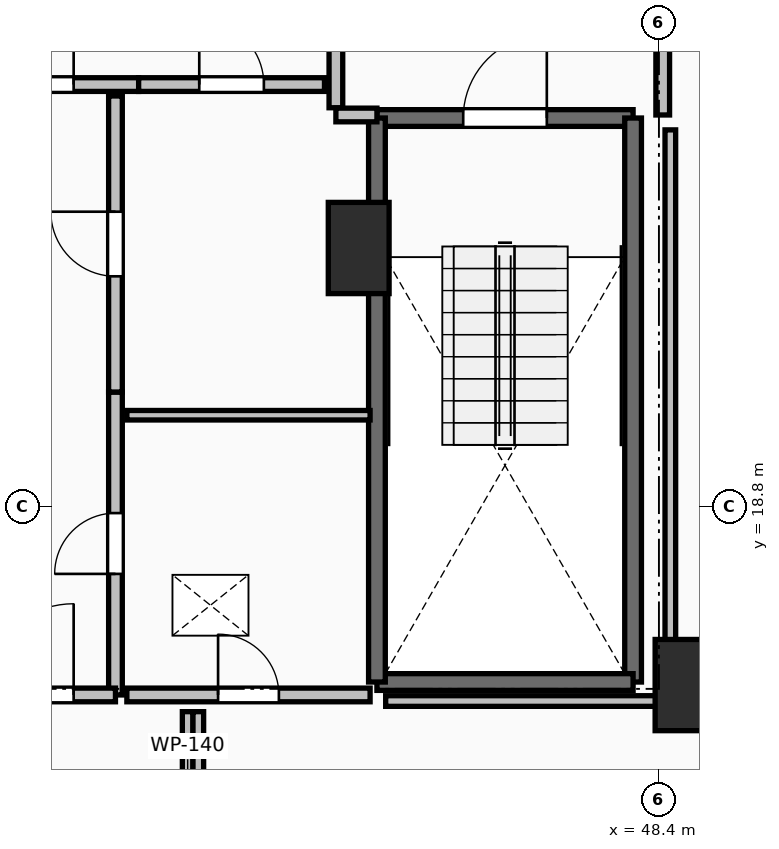
"""IFC4 building model, lengths in metres.
Left out: names, types, materials, properties, quantities, classifications, styles, units other than length and angle.
Written with IfcOpenShell. Run it as: python <this file> out.ifc"""

import sys

from ifc_helpers import new_model, si_unit, direction, frame, frame_2d, origin, origin_2d, place, context, subcontext, project, spatial, rectangle, extrude, element, fill, save


model = new_model("IFC4")
c1 = context("Model", 3, precision=1e-05, world=origin(), true_north=direction((0.0, 1.0)))
c2 = subcontext(c1, "Body", "Model", "MODEL_VIEW")
j1 = project(units=[si_unit("LENGTHUNIT", "METRE"), si_unit("PLANEANGLEUNIT", "RADIAN")], contexts=[c1])
p1 = place(None, origin())
s1 = spatial("IfcSite", under=j1, at=p1, CompositionType="ELEMENT")
p2 = place(p1, origin())
s2 = spatial("IfcBuilding", under=s1, at=p2, CompositionType="ELEMENT")
p3 = place(p2, frame((0.0, 0.0, 167.6)))
s3 = spatial("IfcBuildingStorey", under=s2, at=p3, CompositionType="ELEMENT", Elevation=167.6)
for number, where, z_axis, x_axis in (
    (1, (48.75, 16.45, 0.0), (0.0, 0.0, 1.0), (1.0, 0.0, 0.0)),
    (2, (44.45, 22.2, 0.0), (0.0, 0.0, 1.0), (1.0, 0.0, 0.0)),
):
    element("IfcColumn", number, at=place(p3, frame(where, z_axis=z_axis, x_axis=x_axis)), inside=s3, PredefinedType="PILASTER", context=c2, shape_type="SweptSolid", body=[
        extrude(rectangle(XDim=0.8, YDim=1.2, at=origin_2d()), origin(), (0.0, 0.0, 1.0), 3.5),
    ])
p4 = place(p3, frame((44.69, 23.91, 0.0), z_axis=(0.0, 0.0, 1.0), x_axis=(1.0, 0.0, 0.0)))
e3 = element("IfcWall", 3, at=p4, inside=s3, PredefinedType="SOLIDWALL", context=c2, shape_type="SweptSolid", body=[
    extrude(rectangle(XDim=3.37, YDim=0.22, at=frame_2d((1.685, 0.0))), origin(), (0.0, 0.0, 1.0), 3.24),
])
p5 = place(p4, frame((1.135, 0.0, 0.0)))
e4 = element("IfcOpeningElement", 4, at=p5, cuts=e3, PredefinedType="OPENING", context=c2, shape_type="SweptSolid", body=[
    extrude(rectangle(XDim=1.1, YDim=2.15, at=frame_2d((0.55, 1.075))), frame((0.0, 0.125, 0.0), z_axis=(0.0, -1.0, 0.0), x_axis=(1.0, 0.0, 0.0)), (0.0, 0.0, 1.0), 0.25),
])
p6 = place(p3, frame((48.06, 23.91, 0.0), z_axis=(0.0, 0.0, 1.0), x_axis=(0.0, -1.0, 0.0)))
e5 = element("IfcWall", 5, at=p6, inside=s3, PredefinedType="SOLIDWALL", context=c2, shape_type="SweptSolid", body=[
    extrude(rectangle(XDim=7.42, YDim=0.22, at=frame_2d((3.71, 0.0))), origin(), (0.0, 0.0, 1.0), 3.24),
])
p7 = place(p3, frame((48.06, 16.49, 0.0), z_axis=(0.0, 0.0, 1.0), x_axis=(-1.0, 0.0, 0.0)))
e6 = element("IfcWall", 6, at=p7, inside=s3, PredefinedType="SOLIDWALL", context=c2, shape_type="SweptSolid", body=[
    extrude(rectangle(XDim=3.37, YDim=0.22, at=frame_2d((1.685, 0.0))), origin(), (0.0, 0.0, 1.0), 3.24),
])
p8 = place(p3, frame((44.69, 16.49, 0.0), z_axis=(0.0, 0.0, 1.0), x_axis=(0.0, 1.0, 0.0)))
e7 = element("IfcWall", 7, at=p8, inside=s3, PredefinedType="SOLIDWALL", context=c2, shape_type="SweptSolid", body=[
    extrude(rectangle(XDim=7.42, YDim=0.22, at=frame_2d((3.71, 0.0))), origin(), (0.0, 0.0, 1.0), 3.24),
])
p9 = place(p3, frame((44.15, 27.955, 0.0), z_axis=(0.0, 0.0, 1.0), x_axis=(0.0, -1.0, 0.0)))
e8 = element("IfcWall", 8, at=p9, inside=s3, PredefinedType="PARTITIONING", context=c2, shape_type="SweptSolid", body=[
    extrude(rectangle(XDim=3.91, YDim=0.18, at=frame_2d((1.955, 0.0))), origin(), (0.0, 0.0, 1.0), 3.24),
])
p10 = place(p9, frame((1.355, 0.0, 0.0)))
e9 = element("IfcOpeningElement", 9, at=p10, cuts=e8, PredefinedType="OPENING", context=c2, shape_type="SweptSolid", body=[
    extrude(rectangle(XDim=1.2, YDim=2.15, at=frame_2d((0.6, 1.075))), frame((0.0, 0.105, 0.0), z_axis=(0.0, -1.0, 0.0), x_axis=(1.0, 0.0, 0.0)), (0.0, 0.0, 1.0), 0.21),
])
p11 = place(p3, frame((44.15, 23.95, 0.0), z_axis=(0.0, 0.0, 1.0), x_axis=(1.0, 0.0, 0.0)))
e10 = element("IfcWall", 10, at=p11, inside=s3, PredefinedType="PARTITIONING", context=c2, shape_type="SweptSolid", body=[
    extrude(rectangle(XDim=0.54, YDim=0.18, at=frame_2d((0.27, 0.0))), origin(), (0.0, 0.0, 1.0), 3.24),
])
p12 = place(p3, frame((48.45, 23.95, 0.0), z_axis=(0.0, 0.0, 1.0), x_axis=(0.0, 1.0, 0.0)))
e11 = element("IfcWall", 11, at=p12, inside=s3, PredefinedType="PARTITIONING", context=c2, shape_type="SweptSolid", body=[
    extrude(rectangle(XDim=4.05, YDim=0.18, at=frame_2d((2.025, 0.0))), origin(), (0.0, 0.0, 1.0), 3.24),
])
p13 = place(p12, frame((1.425, 0.0, 0.0)))
e12 = element("IfcOpeningElement", 12, at=p13, cuts=e11, PredefinedType="OPENING", context=c2, shape_type="SweptSolid", body=[
    extrude(rectangle(XDim=1.2, YDim=2.15, at=frame_2d((0.6, 1.075))), frame((0.0, 0.105, 0.0), z_axis=(0.0, -1.0, 0.0), x_axis=(1.0, 0.0, 0.0)), (0.0, 0.0, 1.0), 0.21),
])
p14 = place(p3, frame((38.645, 24.35, 0.0), z_axis=(0.0, 0.0, 1.0), x_axis=(1.0, 0.0, 0.0)))
e13 = element("IfcWall", 13, at=p14, inside=s3, PredefinedType="PARTITIONING", context=c2, shape_type="SweptSolid", body=[
    extrude(rectangle(XDim=2.91, YDim=0.18, at=frame_2d((1.455, 0.0))), origin(), (0.0, 0.0, 1.0), 3.24),
])
p15 = place(p14, frame((0.855, 0.0, 0.0)))
e14 = element("IfcOpeningElement", 14, at=p15, cuts=e13, PredefinedType="OPENING", context=c2, shape_type="SweptSolid", body=[
    extrude(rectangle(XDim=1.2, YDim=2.15, at=frame_2d((0.6, 1.075))), frame((0.0, 0.105, 0.0), z_axis=(0.0, -1.0, 0.0), x_axis=(1.0, 0.0, 0.0)), (0.0, 0.0, 1.0), 0.21),
])
p16 = place(p3, frame((41.555, 24.35, 0.0), z_axis=(0.0, 0.0, 1.0), x_axis=(1.0, 0.0, 0.0)))
e15 = element("IfcWall", 15, at=p16, inside=s3, PredefinedType="PARTITIONING", context=c2, shape_type="SweptSolid", body=[
    extrude(rectangle(XDim=2.445, YDim=0.18, at=frame_2d((1.223, 0.0))), origin(), (0.0, 0.0, 1.0), 3.24),
])
p17 = place(p16, frame((0.798, 0.0, 0.0)))
e16 = element("IfcOpeningElement", 16, at=p17, cuts=e15, PredefinedType="OPENING", context=c2, shape_type="SweptSolid", body=[
    extrude(rectangle(XDim=0.85, YDim=2.1, at=frame_2d((0.425, 1.05))), frame((0.0, 0.105, 0.0), z_axis=(0.0, -1.0, 0.0), x_axis=(1.0, 0.0, 0.0)), (0.0, 0.0, 1.0), 0.21),
])
p18 = place(p3, frame((41.25, 16.32, 0.0), z_axis=(0.0, 0.0, 1.0), x_axis=(0.0, 1.0, 0.0)))
e17 = element("IfcWall", 17, at=p18, inside=s3, PredefinedType="PARTITIONING", context=c2, shape_type="SweptSolid", body=[
    extrude(rectangle(XDim=3.985, YDim=0.18, at=frame_2d((1.992, 0.0))), origin(), (0.0, 0.0, 1.0), 3.24),
])
p19 = place(p18, frame((1.593, 0.0, 0.0)))
e18 = element("IfcOpeningElement", 18, at=p19, cuts=e17, PredefinedType="OPENING", context=c2, shape_type="SweptSolid", body=[
    extrude(rectangle(XDim=0.8, YDim=2.05, at=frame_2d((0.4, 1.025))), frame((0.0, 0.105, 0.0), z_axis=(0.0, -1.0, 0.0), x_axis=(1.0, 0.0, 0.0)), (0.0, 0.0, 1.0), 0.21),
])
p20 = place(p3, frame((41.25, 20.305, 0.0), z_axis=(0.0, 0.0, 1.0), x_axis=(0.0, 1.0, 0.0)))
e19 = element("IfcWall", 19, at=p20, inside=s3, PredefinedType="PARTITIONING", context=c2, shape_type="SweptSolid", body=[
    extrude(rectangle(XDim=3.895, YDim=0.18, at=frame_2d((1.948, 0.0))), origin(), (0.0, 0.0, 1.0), 3.24),
])
p21 = place(p20, frame((1.522, 0.0, 0.0)))
e20 = element("IfcOpeningElement", 20, at=p21, cuts=e19, PredefinedType="OPENING", context=c2, shape_type="SweptSolid", body=[
    extrude(rectangle(XDim=0.85, YDim=2.1, at=frame_2d((0.425, 1.05))), frame((0.0, 0.105, 0.0), z_axis=(0.0, -1.0, 0.0), x_axis=(1.0, 0.0, 0.0)), (0.0, 0.0, 1.0), 0.21),
])
p22 = place(p3, frame((38.95, 16.32, 0.0), z_axis=(0.0, 0.0, 1.0), x_axis=(1.0, 0.0, 0.0)))
e21 = element("IfcWall", 21, at=p22, inside=s3, PredefinedType="PARTITIONING", context=c2, shape_type="SweptSolid", body=[
    extrude(rectangle(XDim=2.3, YDim=0.18, at=frame_2d((1.15, 0.0))), origin(), (0.0, 0.0, 1.0), 3.24),
])
p23 = place(p22, frame((0.55, 0.0, 0.0)))
e22 = element("IfcOpeningElement", 22, at=p23, cuts=e21, PredefinedType="OPENING", context=c2, shape_type="SweptSolid", body=[
    extrude(rectangle(XDim=1.2, YDim=2.15, at=frame_2d((0.6, 1.075))), frame((0.0, 0.105, 0.0), z_axis=(0.0, -1.0, 0.0), x_axis=(1.0, 0.0, 0.0)), (0.0, 0.0, 1.0), 0.21),
])
p24 = place(p3, frame((44.6, 20.0, 0.0), z_axis=(0.0, 0.0, 1.0), x_axis=(-1.0, 0.0, 0.0)))
e23 = element("IfcWall", 23, at=p24, inside=s3, PredefinedType="PARTITIONING", context=c2, shape_type="SweptSolid", body=[
    extrude(rectangle(XDim=3.2, YDim=0.125, at=frame_2d((1.6, 0.0))), origin(), (0.0, 0.0, 1.0), 3.24),
])
p25 = place(p3, frame((41.4, 16.32, 0.0), z_axis=(0.0, 0.0, 1.0), x_axis=(1.0, 0.0, 0.0)))
e24 = element("IfcWall", 24, at=p25, inside=s3, PredefinedType="PARTITIONING", context=c2, shape_type="SweptSolid", body=[
    extrude(rectangle(XDim=3.2, YDim=0.18, at=frame_2d((1.6, 0.0))), origin(), (0.0, 0.0, 1.0), 3.24),
])
p26 = place(p25, frame((1.2, 0.0, 0.0)))
e25 = element("IfcOpeningElement", 25, at=p26, cuts=e24, PredefinedType="OPENING", context=c2, shape_type="SweptSolid", body=[
    extrude(rectangle(XDim=0.8, YDim=2.05, at=frame_2d((0.4, 1.025))), frame((0.0, 0.105, 0.0), z_axis=(0.0, -1.0, 0.0), x_axis=(1.0, 0.0, 0.0)), (0.0, 0.0, 1.0), 0.21),
])
p27 = place(p3, frame((48.55, 16.24, 0.0), z_axis=(0.0, 0.0, 1.0), x_axis=(0.0, 1.0, 0.0)))
e26 = element("IfcWall", 26, at=p27, inside=s3, PredefinedType="PARTITIONING", context=c2, shape_type="SweptSolid", body=[
    extrude(rectangle(XDim=7.514, YDim=0.14, at=frame_2d((3.757, 0.0))), origin(), (0.0, 0.0, 1.0), 2.432),
])
for number, where, z_axis, x_axis in (
    (27, (42.2, 16.1, 0.0), (0.0, 0.0, 1.0), (0.0, -1.0, 0.0)),
    (28, (42.34, 14.27, 0.0), (0.0, 0.0, 1.0), (0.0, 1.0, 0.0)),
):
    element("IfcWall", number, at=place(p3, frame(where, z_axis=z_axis, x_axis=x_axis)), inside=s3, PredefinedType="PARTITIONING", context=c2, shape_type="SweptSolid", body=[
        extrude(rectangle(XDim=1.83, YDim=0.14, at=frame_2d((0.915, 0.0))), origin(), (0.0, 0.0, 1.0), 3.24),
    ])
p28 = place(p3, frame((44.805, 16.24, 0.0), z_axis=(0.0, 0.0, 1.0), x_axis=(1.0, 0.0, 0.0)))
e29 = element("IfcWall", 29, at=p28, inside=s3, PredefinedType="PARTITIONING", context=c2, shape_type="SweptSolid", body=[
    extrude(rectangle(XDim=3.745, YDim=0.14, at=frame_2d((1.873, 0.0))), origin(), (0.0, 0.0, 1.0), 2.432),
])
p29 = place(p5, origin())
e30 = element("IfcDoor", 30, at=p29, inside=s3, OperationType="SINGLE_SWING_RIGHT", PredefinedType="DOOR", context=c2, shape_type="SweptSolid", body=[
    extrude(rectangle(XDim=1.1, YDim=2.15, at=frame_2d((0.55, 1.075))), frame((0.0, 0.025, 0.0), z_axis=(0.0, -1.0, 0.0), x_axis=(1.0, 0.0, 0.0)), (0.0, 0.0, 1.0), 0.05),
])
fill(e4, e30)
p30 = place(p15, origin())
e31 = element("IfcDoor", 31, at=p30, inside=s3, OperationType="SINGLE_SWING_RIGHT", PredefinedType="DOOR", context=c2, shape_type="SweptSolid", body=[
    extrude(rectangle(XDim=1.2, YDim=2.15, at=frame_2d((0.6, 1.075))), frame((0.0, 0.025, 0.0), z_axis=(0.0, -1.0, 0.0), x_axis=(1.0, 0.0, 0.0)), (0.0, 0.0, 1.0), 0.05),
])
fill(e14, e31)
p31 = place(p17, origin())
e32 = element("IfcDoor", 32, at=p31, inside=s3, OperationType="SINGLE_SWING_LEFT", PredefinedType="DOOR", context=c2, shape_type="SweptSolid", body=[
    extrude(rectangle(XDim=0.85, YDim=2.1, at=frame_2d((0.425, 1.05))), frame((0.0, 0.025, 0.0), z_axis=(0.0, -1.0, 0.0), x_axis=(1.0, 0.0, 0.0)), (0.0, 0.0, 1.0), 0.05),
])
fill(e16, e32)
p32 = place(p19, origin())
e33 = element("IfcDoor", 33, at=p32, inside=s3, OperationType="SINGLE_SWING_LEFT", PredefinedType="DOOR", context=c2, shape_type="SweptSolid", body=[
    extrude(rectangle(XDim=0.8, YDim=2.05, at=frame_2d((0.4, 1.025))), frame((0.0, 0.025, 0.0), z_axis=(0.0, -1.0, 0.0), x_axis=(1.0, 0.0, 0.0)), (0.0, 0.0, 1.0), 0.05),
])
fill(e18, e33)
p33 = place(p21, origin())
e34 = element("IfcDoor", 34, at=p33, inside=s3, OperationType="SINGLE_SWING_RIGHT", PredefinedType="DOOR", context=c2, shape_type="SweptSolid", body=[
    extrude(rectangle(XDim=0.85, YDim=2.1, at=frame_2d((0.425, 1.05))), frame((0.0, 0.025, 0.0), z_axis=(0.0, -1.0, 0.0), x_axis=(1.0, 0.0, 0.0)), (0.0, 0.0, 1.0), 0.05),
])
fill(e20, e34)
p34 = place(p23, origin())
e35 = element("IfcDoor", 35, at=p34, inside=s3, OperationType="SINGLE_SWING_RIGHT", PredefinedType="DOOR", context=c2, shape_type="SweptSolid", body=[
    extrude(rectangle(XDim=1.2, YDim=2.15, at=frame_2d((0.6, 1.075))), frame((0.0, 0.025, 0.0), z_axis=(0.0, -1.0, 0.0), x_axis=(1.0, 0.0, 0.0)), (0.0, 0.0, 1.0), 0.05),
])
fill(e22, e35)
p35 = place(p26, origin())
e36 = element("IfcDoor", 36, at=p35, inside=s3, OperationType="SINGLE_SWING_LEFT", PredefinedType="DOOR", context=c2, shape_type="SweptSolid", body=[
    extrude(rectangle(XDim=0.8, YDim=2.05, at=frame_2d((0.4, 1.025))), frame((0.0, 0.025, 0.0), z_axis=(0.0, -1.0, 0.0), x_axis=(1.0, 0.0, 0.0)), (0.0, 0.0, 1.0), 0.05),
])
fill(e25, e36)
save(model, sys.argv[1])
